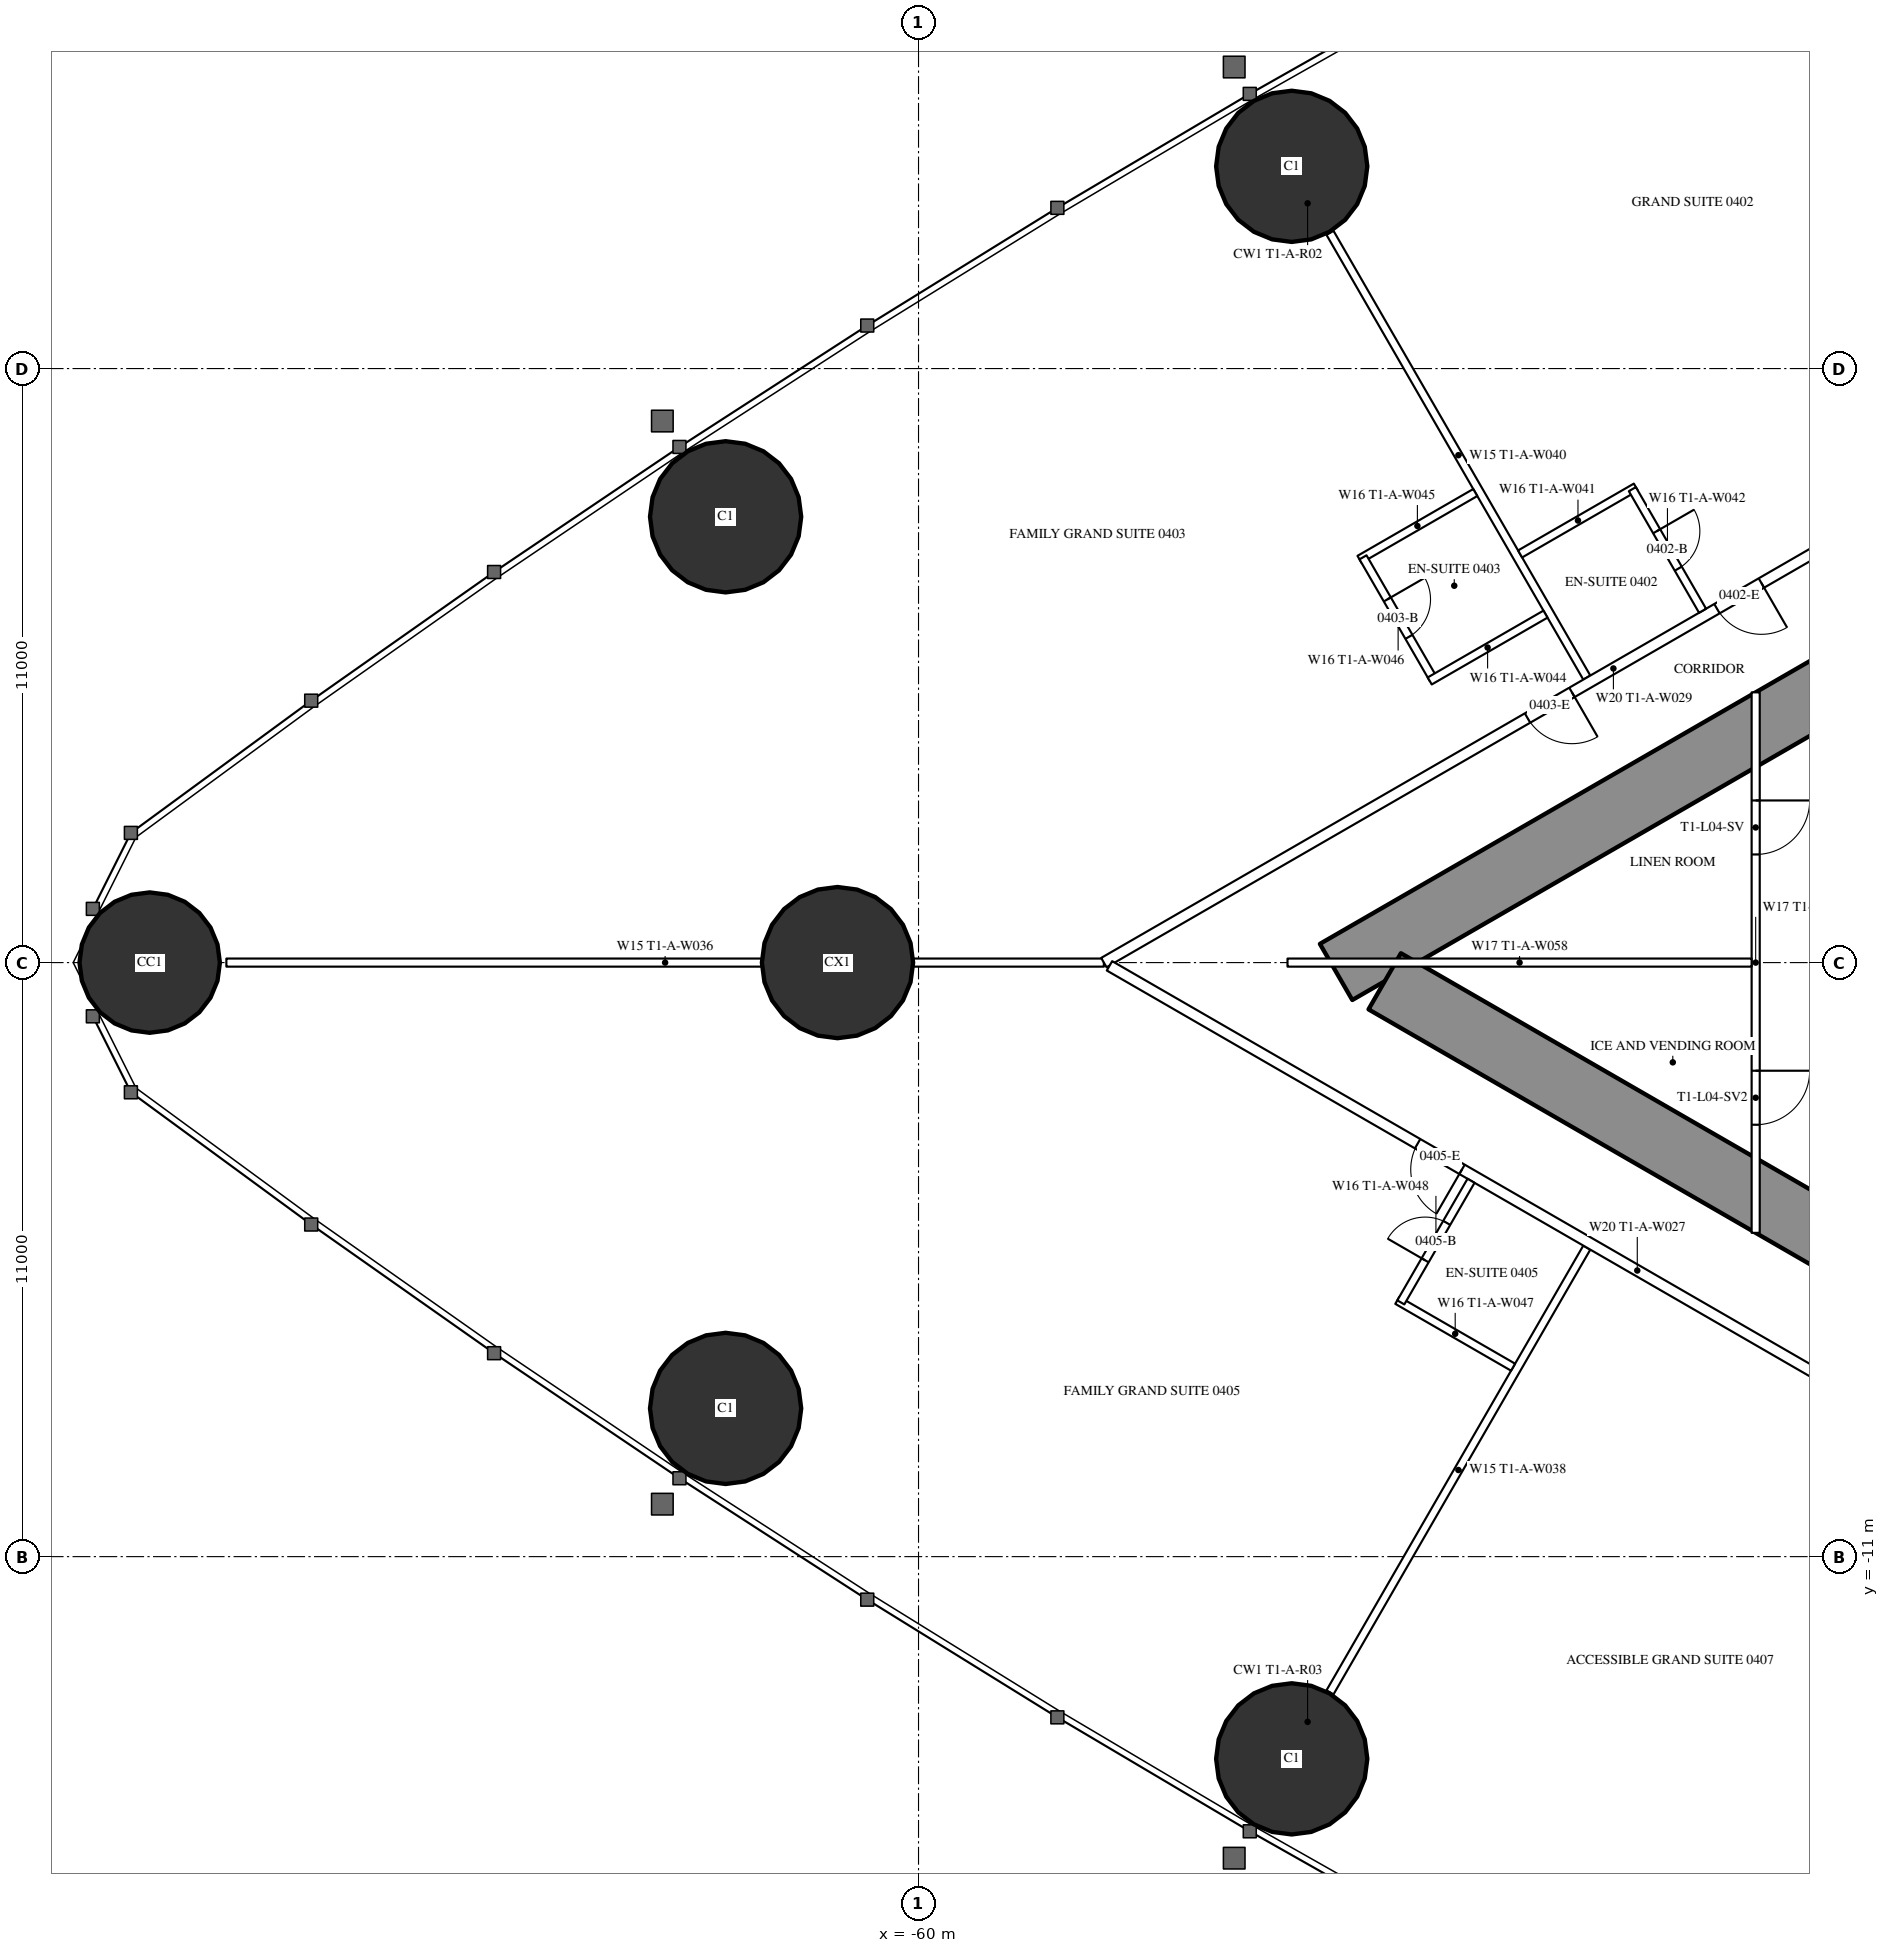
"""IFC4 building model, lengths in metres.
Left out: names, types, materials, properties, quantities, classifications, styles, units other than length and angle.
Written with IfcOpenShell. Run it as: python <this file> out.ifc"""

import sys

from ifc_helpers import new_model, si_unit, direction, frame, frame_2d, origin, origin_2d, place, context, subcontext, project, spatial, rectangle, hollow_circle, extrude, element, fill, save


model = new_model("IFC4")
c1 = context("Model", 3, precision=1e-05, world=origin(), true_north=direction((0.0, 1.0)))
c2 = subcontext(c1, "Body", "Model", "MODEL_VIEW")
j1 = project(units=[si_unit("LENGTHUNIT", "METRE"), si_unit("PLANEANGLEUNIT", "RADIAN")], contexts=[c1])
p1 = place(None, origin())
s1 = spatial("IfcSite", under=j1, at=p1, CompositionType="ELEMENT")
p2 = place(p1, origin())
s2 = spatial("IfcBuilding", under=s1, at=p2, CompositionType="ELEMENT")
p3 = place(p2, frame((0.0, 0.0, 21.5)))
s3 = spatial("IfcBuildingStorey", under=s2, at=p3, CompositionType="ELEMENT", Elevation=21.5)
p4 = place(p3, frame((-74.235, 0.0, 0.0), z_axis=(0.0, 0.0, 1.0), x_axis=(1.0, 0.0, 0.0)))
e1 = element("IfcColumn", 1, at=p4, inside=s3, PredefinedType="COLUMN", context=c2, shape_type="SweptSolid", body=[
    extrude(hollow_circle(Radius=1.3, WallThickness=0.1, at=origin_2d()), origin(), (0.0, 0.0, 1.0), 3.5),
])
for number, where, z_axis, x_axis in (
    (2, (-63.572, -8.255, 0.0), (0.0, 0.0, 1.0), (1.0, 0.0, 0.0)),
    (3, (-53.09, -14.745, 0.0), (0.0, 0.0, 1.0), (1.0, 0.0, 0.0)),
    (4, (-53.09, 14.745, 0.0), (0.0, 0.0, 1.0), (1.0, 0.0, 0.0)),
    (5, (-63.572, 8.255, 0.0), (0.0, 0.0, 1.0), (1.0, 0.0, 0.0)),
):
    element("IfcColumn", number, at=place(p3, frame(where, z_axis=z_axis, x_axis=x_axis)), inside=s3, PredefinedType="COLUMN", context=c2, shape_type="SweptSolid", body=[
        extrude(hollow_circle(Radius=1.4, WallThickness=0.12, at=origin_2d()), origin(), (0.0, 0.0, 1.0), 3.5),
    ])
p5 = place(p3, frame((-61.5, 0.0, 0.0), z_axis=(0.0, 0.0, 1.0), x_axis=(1.0, 0.0, 0.0)))
e6 = element("IfcColumn", 6, at=p5, inside=s3, PredefinedType="COLUMN", context=c2, shape_type="SweptSolid", body=[
    extrude(hollow_circle(Radius=1.4, WallThickness=0.1, at=origin_2d()), origin(), (0.0, 0.0, 1.0), 3.5),
])
p6 = place(p3, frame((-27.2, 14.3, 0.0), z_axis=(0.0, 0.0, 1.0), x_axis=(-0.866026593062, -0.499997940104, 0.0)))
e7 = element("IfcWall", 7, at=p6, inside=s3, PredefinedType="SHEAR", context=c2, shape_type="SweptSolid", body=[
    extrude(rectangle(XDim=28.946, YDim=1.2, at=frame_2d((14.473, 0.0))), origin(), (0.0, 0.0, 1.0), 3.5),
])
p7 = place(p6, frame((4.6, 0.0, 0.0)))
e8 = element("IfcOpeningElement", 8, at=p7, cuts=e7, PredefinedType="OPENING", context=c2, shape_type="SweptSolid", body=[
    extrude(rectangle(XDim=1.0, YDim=2.2, at=frame_2d((0.5, 1.1))), frame((0.0, 0.61, 0.0), z_axis=(0.0, -1.0, 0.0), x_axis=(1.0, 0.0, 0.0)), (0.0, 0.0, 1.0), 1.22),
])
p8 = place(p6, frame((13.395, 0.0, 0.0)))
e9 = element("IfcOpeningElement", 9, at=p8, cuts=e7, PredefinedType="OPENING", context=c2, shape_type="SweptSolid", body=[
    extrude(rectangle(XDim=1.8, YDim=2.2, at=frame_2d((0.9, 1.1))), frame((0.0, 0.61, 0.0), z_axis=(0.0, -1.0, 0.0), x_axis=(1.0, 0.0, 0.0)), (0.0, 0.0, 1.0), 1.22),
])
p9 = place(p3, frame((-27.2, -14.3, 0.0), z_axis=(0.0, 0.0, 1.0), x_axis=(-0.866024021859, 0.500002393557, 0.0)))
e10 = element("IfcWall", 10, at=p9, inside=s3, PredefinedType="SHEAR", context=c2, shape_type="SweptSolid", body=[
    extrude(rectangle(XDim=27.907, YDim=1.2, at=frame_2d((13.954, 0.0))), origin(), (0.0, 0.0, 1.0), 3.5),
])
p10 = place(p9, frame((4.6, 0.0, 0.0)))
e11 = element("IfcOpeningElement", 11, at=p10, cuts=e10, PredefinedType="OPENING", context=c2, shape_type="SweptSolid", body=[
    extrude(rectangle(XDim=1.0, YDim=2.2, at=frame_2d((0.5, 1.1))), frame((0.0, 0.61, 0.0), z_axis=(0.0, -1.0, 0.0), x_axis=(1.0, 0.0, 0.0)), (0.0, 0.0, 1.0), 1.22),
])
p11 = place(p9, frame((13.395, 0.0, 0.0)))
e12 = element("IfcOpeningElement", 12, at=p11, cuts=e10, PredefinedType="OPENING", context=c2, shape_type="SweptSolid", body=[
    extrude(rectangle(XDim=1.8, YDim=2.2, at=frame_2d((0.9, 1.1))), frame((0.0, 0.61, 0.0), z_axis=(0.0, -1.0, 0.0), x_axis=(1.0, 0.0, 0.0)), (0.0, 0.0, 1.0), 1.22),
])
for number, where, z_axis, x_axis in (
    (13, (-47.627, 5.278, 0.0), (0.0, 0.0, 1.0), (-0.5, 0.866, 0.0)),
    (14, (-47.627, -5.278, 0.0), (0.0, 0.0, 1.0), (-0.5, -0.866, 0.0)),
):
    element("IfcWall", number, at=place(p3, frame(where, z_axis=z_axis, x_axis=x_axis)), inside=s3, PredefinedType="PARTITIONING", context=c2, shape_type="SweptSolid", body=[
        extrude(rectangle(XDim=9.51, YDim=0.15, at=frame_2d((4.755, 0.0))), origin(), (0.0, 0.0, 1.0), 2.25),
    ])
p12 = place(p3, frame((-56.568, 0.0, 0.0), z_axis=(0.0, 0.0, 1.0), x_axis=(-1.0, 0.0, 0.0)))
e15 = element("IfcWall", 15, at=p12, inside=s3, PredefinedType="PARTITIONING", context=c2, shape_type="SweptSolid", body=[
    extrude(rectangle(XDim=16.247, YDim=0.15, at=frame_2d((8.124, 0.0))), origin(), (0.0, 0.0, 1.0), 2.25),
])
p13 = place(p3, frame((-37.7, 10.894, 0.0), z_axis=(0.0, 0.0, 1.0), x_axis=(-0.866027905338, -0.499995667157, 0.0)))
e16 = element("IfcWall", 16, at=p13, inside=s3, PredefinedType="PARTITIONING", context=c2, shape_type="SweptSolid", body=[
    extrude(rectangle(XDim=21.787, YDim=0.2, at=frame_2d((10.894, 0.0))), origin(), (0.0, 0.0, 1.0), 3.25),
])
p14 = place(p13, frame((11.78, 0.0, 0.0)))
e17 = element("IfcOpeningElement", 17, at=p14, cuts=e16, PredefinedType="OPENING", context=c2, shape_type="SweptSolid", body=[
    extrude(rectangle(XDim=0.95, YDim=2.2, at=frame_2d((0.475, 1.1))), frame((0.0, 0.11, 0.0), z_axis=(0.0, -1.0, 0.0), x_axis=(1.0, 0.0, 0.0)), (0.0, 0.0, 1.0), 0.22),
])
p15 = place(p13, frame((7.73, 0.0, 0.0)))
e18 = element("IfcOpeningElement", 18, at=p15, cuts=e16, PredefinedType="OPENING", context=c2, shape_type="SweptSolid", body=[
    extrude(rectangle(XDim=0.95, YDim=2.2, at=frame_2d((0.475, 1.1))), frame((0.0, 0.11, 0.0), z_axis=(0.0, -1.0, 0.0), x_axis=(1.0, 0.0, 0.0)), (0.0, 0.0, 1.0), 0.22),
])
p16 = place(p3, frame((-36.92, -11.344, 0.0), z_axis=(0.0, 0.0, 1.0), x_axis=(-0.866028313256, 0.499994960614, 0.0)))
e19 = element("IfcWall", 19, at=p16, inside=s3, PredefinedType="PARTITIONING", context=c2, shape_type="SweptSolid", body=[
    extrude(rectangle(XDim=22.568, YDim=0.2, at=frame_2d((11.284, 0.0))), origin(), (0.0, 0.0, 1.0), 3.25),
])
p17 = place(p16, frame((15.03, 0.0, 0.0)))
e20 = element("IfcOpeningElement", 20, at=p17, cuts=e19, PredefinedType="OPENING", context=c2, shape_type="SweptSolid", body=[
    extrude(rectangle(XDim=0.95, YDim=2.2, at=frame_2d((0.475, 1.1))), frame((0.0, 0.11, 0.0), z_axis=(0.0, -1.0, 0.0), x_axis=(1.0, 0.0, 0.0)), (0.0, 0.0, 1.0), 0.22),
])
p18 = place(p16, frame((3.35, 0.0, 0.0)))
e21 = element("IfcOpeningElement", 21, at=p18, cuts=e19, PredefinedType="OPENING", context=c2, shape_type="SweptSolid", body=[
    extrude(rectangle(XDim=1.0, YDim=2.2, at=frame_2d((0.5, 1.1))), frame((0.0, 0.11, 0.0), z_axis=(0.0, -1.0, 0.0), x_axis=(1.0, 0.0, 0.0)), (0.0, 0.0, 1.0), 0.22),
])
p19 = place(p3, frame((-49.692, 8.704, 0.0), z_axis=(0.0, 0.0, 1.0), x_axis=(-0.866073894602, -0.499916002032, 0.0)))
e22 = element("IfcWall", 22, at=p19, inside=s3, PredefinedType="PARTITIONING", context=c2, shape_type="SweptSolid", body=[
    extrude(rectangle(XDim=2.475, YDim=0.15, at=frame_2d((1.238, 0.0))), origin(), (0.0, 0.0, 1.0), 3.25),
])
p20 = place(p3, frame((-50.47, 5.253, 0.0), z_axis=(0.0, 0.0, 1.0), x_axis=(-0.500006934395, 0.866021400173, 0.0)))
e23 = element("IfcWall", 23, at=p20, inside=s3, PredefinedType="PARTITIONING", context=c2, shape_type="SweptSolid", body=[
    extrude(rectangle(XDim=2.6, YDim=0.15, at=frame_2d((1.3, 0.0))), origin(), (0.0, 0.0, 1.0), 3.25),
])
p21 = place(p20, frame((0.9, 0.0, 0.0)))
e24 = element("IfcOpeningElement", 24, at=p21, cuts=e23, PredefinedType="OPENING", context=c2, shape_type="SweptSolid", body=[
    extrude(rectangle(XDim=0.8, YDim=2.2, at=frame_2d((0.4, 1.1))), frame((0.0, 0.085, 0.0), z_axis=(0.0, -1.0, 0.0), x_axis=(1.0, 0.0, 0.0)), (0.0, 0.0, 1.0), 0.17),
])
p22 = place(p3, frame((-48.392, 6.453, 0.0), z_axis=(0.0, 0.0, 1.0), x_axis=(-0.86604923931, -0.499958713387, 0.0)))
e25 = element("IfcWall", 25, at=p22, inside=s3, PredefinedType="PARTITIONING", context=c2, shape_type="SweptSolid", body=[
    extrude(rectangle(XDim=2.475, YDim=0.15, at=frame_2d((1.237, 0.0))), origin(), (0.0, 0.0, 1.0), 3.25),
])
p23 = place(p3, frame((-48.992, -7.492, 0.0), z_axis=(0.0, 0.0, 1.0), x_axis=(-0.866031185235, 0.4999899861, 0.0)))
e26 = element("IfcWall", 26, at=p23, inside=s3, PredefinedType="PARTITIONING", context=c2, shape_type="SweptSolid", body=[
    extrude(rectangle(XDim=2.475, YDim=0.15, at=frame_2d((1.238, 0.0))), origin(), (0.0, 0.0, 1.0), 3.25),
])
p24 = place(p3, frame((-49.77, -4.04, 0.0), z_axis=(0.0, 0.0, 1.0), x_axis=(-0.500006934395, -0.866021400173, 0.0)))
e27 = element("IfcWall", 27, at=p24, inside=s3, PredefinedType="PARTITIONING", context=c2, shape_type="SweptSolid", body=[
    extrude(rectangle(XDim=2.6, YDim=0.15, at=frame_2d((1.3, 0.0))), origin(), (0.0, 0.0, 1.0), 3.25),
])
p25 = place(p24, frame((0.9, 0.0, 0.0)))
e28 = element("IfcOpeningElement", 28, at=p25, cuts=e27, PredefinedType="OPENING", context=c2, shape_type="SweptSolid", body=[
    extrude(rectangle(XDim=0.8, YDim=2.2, at=frame_2d((0.4, 1.1))), frame((0.0, 0.085, 0.0), z_axis=(0.0, -1.0, 0.0), x_axis=(1.0, 0.0, 0.0)), (0.0, 0.0, 1.0), 0.17),
])
p26 = place(p3, frame((-46.719, 8.804, 0.0), z_axis=(0.0, 0.0, 1.0), x_axis=(-0.866006523861, -0.500032699561, 0.0)))
e29 = element("IfcWall", 29, at=p26, inside=s3, PredefinedType="PARTITIONING", context=c2, shape_type="SweptSolid", body=[
    extrude(rectangle(XDim=2.475, YDim=0.15, at=frame_2d((1.237, 0.0))), origin(), (0.0, 0.0, 1.0), 3.25),
])
p27 = place(p3, frame((-45.483, 6.515, 0.0), z_axis=(0.0, 0.0, 1.0), x_axis=(-0.500006934395, 0.866021400173, 0.0)))
e30 = element("IfcWall", 30, at=p27, inside=s3, PredefinedType="PARTITIONING", context=c2, shape_type="SweptSolid", body=[
    extrude(rectangle(XDim=2.6, YDim=0.15, at=frame_2d((1.3, 0.0))), origin(), (0.0, 0.0, 1.0), 3.25),
])
p28 = place(p27, frame((0.9, 0.0, 0.0)))
e31 = element("IfcOpeningElement", 31, at=p28, cuts=e30, PredefinedType="OPENING", context=c2, shape_type="SweptSolid", body=[
    extrude(rectangle(XDim=0.8, YDim=2.2, at=frame_2d((0.4, 1.1))), frame((0.0, 0.085, 0.0), z_axis=(0.0, -1.0, 0.0), x_axis=(1.0, 0.0, 0.0)), (0.0, 0.0, 1.0), 0.17),
])
p29 = place(p3, frame((-44.5, 5.005, 0.0), z_axis=(0.0, 0.0, 1.0), x_axis=(0.0, -1.0, 0.0)))
e32 = element("IfcWall", 32, at=p29, inside=s3, PredefinedType="PARTITIONING", context=c2, shape_type="SweptSolid", body=[
    extrude(rectangle(XDim=10.009, YDim=0.15, at=frame_2d((5.005, 0.0))), origin(), (0.0, 0.0, 1.0), 2.45),
])
p30 = place(p29, frame((2.002, 0.0, 0.0)))
e33 = element("IfcOpeningElement", 33, at=p30, cuts=e32, PredefinedType="OPENING", context=c2, shape_type="SweptSolid", body=[
    extrude(rectangle(XDim=1.0, YDim=2.2, at=frame_2d((0.5, 1.1))), frame((0.0, 0.085, 0.0), z_axis=(0.0, -1.0, 0.0), x_axis=(1.0, 0.0, 0.0)), (0.0, 0.0, 1.0), 0.17),
])
p31 = place(p29, frame((7.007, 0.0, 0.0)))
e34 = element("IfcOpeningElement", 34, at=p31, cuts=e32, PredefinedType="OPENING", context=c2, shape_type="SweptSolid", body=[
    extrude(rectangle(XDim=1.0, YDim=2.2, at=frame_2d((0.5, 1.1))), frame((0.0, 0.085, 0.0), z_axis=(0.0, -1.0, 0.0), x_axis=(1.0, 0.0, 0.0)), (0.0, 0.0, 1.0), 0.17),
])
p32 = place(p3, frame((-44.575, 0.0, 0.0), z_axis=(0.0, 0.0, 1.0), x_axis=(-1.0, 0.0, 0.0)))
e35 = element("IfcWall", 35, at=p32, inside=s3, PredefinedType="PARTITIONING", context=c2, shape_type="SweptSolid", body=[
    extrude(rectangle(XDim=8.593, YDim=0.15, at=frame_2d((4.297, 0.0))), origin(), (0.0, 0.0, 1.0), 2.25),
])
p33 = place(p21, origin())
e36 = element("IfcDoor", 36, at=p33, inside=s3, OperationType="SINGLE_SWING_RIGHT", PredefinedType="DOOR", context=c2, shape_type="SweptSolid", body=[
    extrude(rectangle(XDim=0.8, YDim=2.2, at=frame_2d((0.4, 1.1))), frame((0.0, 0.025, 0.0), z_axis=(0.0, -1.0, 0.0), x_axis=(1.0, 0.0, 0.0)), (0.0, 0.0, 1.0), 0.05),
])
fill(e24, e36)
p34 = place(p14, origin())
e37 = element("IfcDoor", 37, at=p34, inside=s3, OperationType="SINGLE_SWING_LEFT", PredefinedType="DOOR", context=c2, shape_type="SweptSolid", body=[
    extrude(rectangle(XDim=0.95, YDim=2.2, at=frame_2d((0.475, 1.1))), frame((0.0, 0.025, 0.0), z_axis=(0.0, -1.0, 0.0), x_axis=(1.0, 0.0, 0.0)), (0.0, 0.0, 1.0), 0.05),
])
fill(e17, e37)
p35 = place(p25, origin())
e38 = element("IfcDoor", 38, at=p35, inside=s3, OperationType="SINGLE_SWING_RIGHT", PredefinedType="DOOR", context=c2, shape_type="SweptSolid", body=[
    extrude(rectangle(XDim=0.8, YDim=2.2, at=frame_2d((0.4, 1.1))), frame((0.0, 0.025, 0.0), z_axis=(0.0, -1.0, 0.0), x_axis=(1.0, 0.0, 0.0)), (0.0, 0.0, 1.0), 0.05),
])
fill(e28, e38)
p36 = place(p17, origin())
e39 = element("IfcDoor", 39, at=p36, inside=s3, OperationType="SINGLE_SWING_LEFT", PredefinedType="DOOR", context=c2, shape_type="SweptSolid", body=[
    extrude(rectangle(XDim=0.95, YDim=2.2, at=frame_2d((0.475, 1.1))), frame((0.0, 0.025, 0.0), z_axis=(0.0, -1.0, 0.0), x_axis=(1.0, 0.0, 0.0)), (0.0, 0.0, 1.0), 0.05),
])
fill(e20, e39)
p37 = place(p28, origin())
e40 = element("IfcDoor", 40, at=p37, inside=s3, OperationType="SINGLE_SWING_RIGHT", PredefinedType="DOOR", context=c2, shape_type="SweptSolid", body=[
    extrude(rectangle(XDim=0.8, YDim=2.2, at=frame_2d((0.4, 1.1))), frame((0.0, 0.025, 0.0), z_axis=(0.0, -1.0, 0.0), x_axis=(1.0, 0.0, 0.0)), (0.0, 0.0, 1.0), 0.05),
])
fill(e31, e40)
p38 = place(p15, origin())
e41 = element("IfcDoor", 41, at=p38, inside=s3, OperationType="SINGLE_SWING_LEFT", PredefinedType="DOOR", context=c2, shape_type="SweptSolid", body=[
    extrude(rectangle(XDim=0.95, YDim=2.2, at=frame_2d((0.475, 1.1))), frame((0.0, 0.025, 0.0), z_axis=(0.0, -1.0, 0.0), x_axis=(1.0, 0.0, 0.0)), (0.0, 0.0, 1.0), 0.05),
])
fill(e18, e41)
p39 = place(p30, origin())
e42 = element("IfcDoor", 42, at=p39, inside=s3, OperationType="SINGLE_SWING_LEFT", PredefinedType="DOOR", context=c2, shape_type="SweptSolid", body=[
    extrude(rectangle(XDim=1.0, YDim=2.2, at=frame_2d((0.5, 1.1))), frame((0.0, 0.025, 0.0), z_axis=(0.0, -1.0, 0.0), x_axis=(1.0, 0.0, 0.0)), (0.0, 0.0, 1.0), 0.05),
])
fill(e33, e42)
p40 = place(p31, origin())
e43 = element("IfcDoor", 43, at=p40, inside=s3, OperationType="SINGLE_SWING_LEFT", PredefinedType="DOOR", context=c2, shape_type="SweptSolid", body=[
    extrude(rectangle(XDim=1.0, YDim=2.2, at=frame_2d((0.5, 1.1))), frame((0.0, 0.025, 0.0), z_axis=(0.0, -1.0, 0.0), x_axis=(1.0, 0.0, 0.0)), (0.0, 0.0, 1.0), 0.05),
])
fill(e34, e43)
save(model, sys.argv[1])
